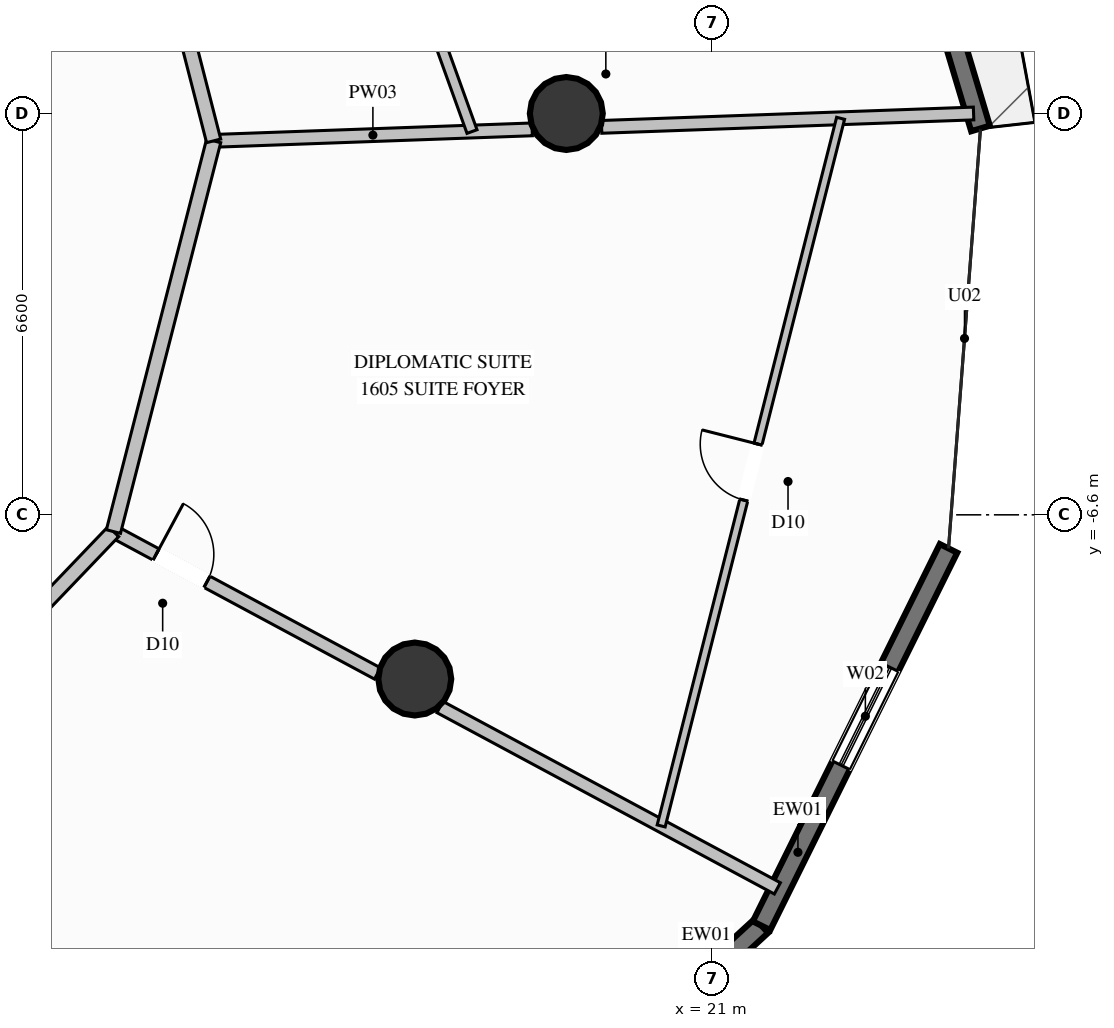
"""IFC4 building model, lengths in metres.
Left out: names, types, materials, properties, quantities, classifications, styles, units other than length and angle.
Written with IfcOpenShell. Run it as: python <this file> out.ifc"""

import sys

from ifc_helpers import new_model, si_unit, direction, frame, frame_2d, origin, origin_2d, place, context, subcontext, project, spatial, rectangle, circle, extrude, element, fill, save


model = new_model("IFC4")
c1 = context("Model", 3, precision=1e-05, world=origin(), true_north=direction((0.0, 1.0)))
c2 = subcontext(c1, "Body", "Model", "MODEL_VIEW")
j1 = project(units=[si_unit("LENGTHUNIT", "METRE"), si_unit("PLANEANGLEUNIT", "RADIAN")], contexts=[c1])
p1 = place(None, origin())
s1 = spatial("IfcSite", under=j1, at=p1, CompositionType="ELEMENT")
p2 = place(p1, origin())
s2 = spatial("IfcBuilding", under=s1, at=p2, CompositionType="ELEMENT")
p3 = place(p2, frame((0.0, 0.0, 60.8)))
s3 = spatial("IfcBuildingStorey", under=s2, at=p3, CompositionType="ELEMENT", Elevation=60.8)
for number, where, z_axis, x_axis in (
    (1, (18.6, 0.0, 0.0), (0.0, 0.0, 1.0), (1.0, 0.0, 0.0)),
    (2, (16.108, -9.3, 0.0), (0.0, 0.0, 1.0), (1.0, 0.0, 0.0)),
):
    element("IfcColumn", number, at=place(p3, frame(where, z_axis=z_axis, x_axis=x_axis)), inside=s3, PredefinedType="COLUMN", context=c2, shape_type="SweptSolid", body=[
        extrude(circle(Radius=0.6, at=origin_2d()), origin(), (0.0, 0.0, 1.0), 3.6),
    ])
p4 = place(p3, frame((23.338, 6.683, 0.0), z_axis=(0.0, 0.0, 1.0), x_axis=(0.286771852206, -0.957998906462, 0.0)))
e3 = element("IfcWall", 3, at=p4, inside=s3, PredefinedType="SOLIDWALL", context=c2, shape_type="SweptSolid", body=[
    extrude(rectangle(XDim=7.233, YDim=0.32, at=frame_2d((3.616, 0.0))), origin(), (0.0, 0.0, 1.0), 3.34),
])
p5 = place(p4, frame((2.789, 0.0, 0.35)))
e4 = element("IfcOpeningElement", 4, at=p5, cuts=e3, PredefinedType="OPENING", context=c2, shape_type="SweptSolid", body=[
    extrude(rectangle(XDim=1.8, YDim=2.6, at=frame_2d((0.9, 1.3))), frame((0.0, 0.17, 0.0), z_axis=(0.0, -1.0, 0.0), x_axis=(1.0, 0.0, 0.0)), (0.0, 0.0, 1.0), 0.34),
])
p6 = place(p3, frame((21.811, -13.357, 0.0), z_axis=(0.0, 0.0, 1.0), x_axis=(-0.735876522022, -0.677115754016, 0.0)))
e5 = element("IfcWall", 5, at=p6, inside=s3, PredefinedType="SOLIDWALL", context=c2, shape_type="SweptSolid", body=[
    extrude(rectangle(XDim=7.234, YDim=0.32, at=frame_2d((3.617, 0.0))), origin(), (0.0, 0.0, 1.0), 3.34),
])
p7 = place(p6, frame((2.717, 0.0, 0.35)))
e6 = element("IfcOpeningElement", 6, at=p7, cuts=e5, PredefinedType="OPENING", context=c2, shape_type="SweptSolid", body=[
    extrude(rectangle(XDim=1.8, YDim=2.6, at=frame_2d((0.9, 1.3))), frame((0.0, 0.17, 0.0), z_axis=(0.0, -1.0, 0.0), x_axis=(1.0, 0.0, 0.0)), (0.0, 0.0, 1.0), 0.34),
])
p8 = place(p3, frame((24.886, -7.152, 0.0), z_axis=(0.0, 0.0, 1.0), x_axis=(-0.444037823644, -0.896008041914, 0.0)))
e7 = element("IfcWall", 7, at=p8, inside=s3, PredefinedType="SOLIDWALL", context=c2, shape_type="SweptSolid", body=[
    extrude(rectangle(XDim=6.925, YDim=0.32, at=frame_2d((3.462, 0.0))), origin(), (0.0, 0.0, 1.0), 3.34),
])
p9 = place(p8, frame((2.18, 0.0, 0.35)))
e8 = element("IfcOpeningElement", 8, at=p9, cuts=e7, PredefinedType="OPENING", context=c2, shape_type="SweptSolid", body=[
    extrude(rectangle(XDim=1.8, YDim=2.6, at=frame_2d((0.9, 1.3))), frame((0.0, 0.17, 0.0), z_axis=(0.0, -1.0, 0.0), x_axis=(1.0, 0.0, 0.0)), (0.0, 0.0, 1.0), 0.34),
])
p10 = place(p3, frame((12.8, -0.45, 0.0), z_axis=(0.0, 0.0, 1.0), x_axis=(0.999349913371, 0.03605205467, 0.0)))
e9 = element("IfcWall", 9, at=p10, inside=s3, PredefinedType="PARTITIONING", context=c2, shape_type="SweptSolid", body=[
    extrude(rectangle(XDim=5.241, YDim=0.21, at=frame_2d((2.621, 0.0))), origin(), (0.0, 0.0, 1.0), 2.709),
])
p11 = place(p3, frame((19.18, -0.22, 0.0), z_axis=(0.0, 0.0, 1.0), x_axis=(0.999354291278, 0.035930495469, 0.0)))
e10 = element("IfcWall", 10, at=p11, inside=s3, PredefinedType="PARTITIONING", context=c2, shape_type="SweptSolid", body=[
    extrude(rectangle(XDim=6.122, YDim=0.21, at=frame_2d((3.061, 0.0))), origin(), (0.0, 0.0, 1.0), 3.34),
])
p12 = place(p3, frame((11.152, -6.875, 0.0), z_axis=(0.0, 0.0, 1.0), x_axis=(0.880857176103, -0.473382123984, 0.0)))
e11 = element("IfcWall", 11, at=p12, inside=s3, PredefinedType="PARTITIONING", context=c2, shape_type="SweptSolid", body=[
    extrude(rectangle(XDim=4.93, YDim=0.21, at=frame_2d((2.465, 0.0))), origin(), (0.0, 0.0, 1.0), 2.709),
])
p13 = place(p12, frame((0.796, 0.0, 0.0)))
e12 = element("IfcOpeningElement", 12, at=p13, cuts=e11, PredefinedType="OPENING", context=c2, shape_type="SweptSolid", body=[
    extrude(rectangle(XDim=0.95, YDim=2.1, at=frame_2d((0.475, 1.05))), frame((0.0, 0.115, 0.0), z_axis=(0.0, -1.0, 0.0), x_axis=(1.0, 0.0, 0.0)), (0.0, 0.0, 1.0), 0.23),
])
p14 = place(p3, frame((16.522, -9.761, 0.0), z_axis=(0.0, 0.0, 1.0), x_axis=(0.880870251888, -0.473357792097, 0.0)))
e13 = element("IfcWall", 13, at=p14, inside=s3, PredefinedType="PARTITIONING", context=c2, shape_type="SweptSolid", body=[
    extrude(rectangle(XDim=6.3, YDim=0.21, at=frame_2d((3.15, 0.0))), origin(), (0.0, 0.0, 1.0), 3.34),
])
p15 = place(p3, frame((6.65, -11.578, 0.0), z_axis=(0.0, 0.0, 1.0), x_axis=(0.691526541012, 0.72235105252, 0.0)))
e14 = element("IfcWall", 14, at=p15, inside=s3, PredefinedType="PARTITIONING", context=c2, shape_type="SweptSolid", body=[
    extrude(rectangle(XDim=6.51, YDim=0.24, at=frame_2d((3.255, 0.0))), origin(), (0.0, 0.0, 1.0), 3.34),
])
p16 = place(p3, frame((11.152, -6.875, 0.0), z_axis=(0.0, 0.0, 1.0), x_axis=(0.248446193127, 0.968645698447, 0.0)))
e15 = element("IfcWall", 15, at=p16, inside=s3, PredefinedType="PARTITIONING", context=c2, shape_type="SweptSolid", body=[
    extrude(rectangle(XDim=6.633, YDim=0.24, at=frame_2d((3.316, 0.0))), origin(), (0.0, 0.0, 1.0), 3.34),
])
p17 = place(p3, frame((20.16, -11.716, 0.0), z_axis=(0.0, 0.0, 1.0), x_axis=(0.245821486201, 0.969315117453, 0.0)))
e16 = element("IfcWall", 16, at=p17, inside=s3, PredefinedType="PARTITIONING", context=c2, shape_type="SweptSolid", body=[
    extrude(rectangle(XDim=12.005, YDim=0.135, at=frame_2d((6.003, 0.0))), origin(), (0.0, 0.0, 1.0), 3.34),
])
p18 = place(p17, frame((5.528, 0.0, 0.0)))
e17 = element("IfcOpeningElement", 17, at=p18, cuts=e16, PredefinedType="OPENING", context=c2, shape_type="SweptSolid", body=[
    extrude(rectangle(XDim=0.95, YDim=2.1, at=frame_2d((0.475, 1.05))), frame((0.0, 0.078, 0.0), z_axis=(0.0, -1.0, 0.0), x_axis=(1.0, 0.0, 0.0)), (0.0, 0.0, 1.0), 0.155),
])
p19 = place(p3, frame((12.8, -0.45, 0.0), z_axis=(0.0, 0.0, 1.0), x_axis=(-0.248491333658, 0.968634119313, 0.0)))
e18 = element("IfcWall", 18, at=p19, inside=s3, PredefinedType="PARTITIONING", context=c2, shape_type="SweptSolid", body=[
    extrude(rectangle(XDim=2.785, YDim=0.24, at=frame_2d((1.393, 0.0))), origin(), (0.0, 0.0, 1.0), 3.34),
])
p20 = place(p3, frame((17.049, -0.297, 0.0), z_axis=(0.0, 0.0, 1.0), x_axis=(-0.338731363066, 0.940883129658, 0.0)))
e19 = element("IfcWall", 19, at=p20, inside=s3, PredefinedType="PLUMBINGWALL", context=c2, shape_type="SweptSolid", body=[
    extrude(rectangle(XDim=3.634, YDim=0.175, at=frame_2d((1.817, 0.0))), origin(), (0.0, 0.0, 1.0), 3.34),
])
p21 = place(p9, origin())
e20 = element("IfcWindow", 20, at=p21, inside=s3, PartitioningType="SINGLE_PANEL", PredefinedType="WINDOW", context=c2, shape_type="SweptSolid", body=[
    extrude(rectangle(XDim=1.8, YDim=2.6, at=frame_2d((0.9, 1.3))), frame((0.0, 0.03, 0.0), z_axis=(0.0, -1.0, 0.0), x_axis=(1.0, 0.0, 0.0)), (0.0, 0.0, 1.0), 0.06),
])
fill(e8, e20)
p22 = place(p13, origin())
e21 = element("IfcDoor", 21, at=p22, inside=s3, OperationType="SINGLE_SWING_LEFT", PredefinedType="DOOR", context=c2, shape_type="SweptSolid", body=[
    extrude(rectangle(XDim=0.95, YDim=2.1, at=frame_2d((0.475, 1.05))), frame((0.0, 0.025, 0.0), z_axis=(0.0, -1.0, 0.0), x_axis=(1.0, 0.0, 0.0)), (0.0, 0.0, 1.0), 0.05),
])
fill(e12, e21)
p23 = place(p18, origin())
e22 = element("IfcDoor", 22, at=p23, inside=s3, OperationType="SINGLE_SWING_RIGHT", PredefinedType="DOOR", context=c2, shape_type="SweptSolid", body=[
    extrude(rectangle(XDim=0.95, YDim=2.1, at=frame_2d((0.475, 1.05))), frame((0.0, 0.025, 0.0), z_axis=(0.0, -1.0, 0.0), x_axis=(1.0, 0.0, 0.0)), (0.0, 0.0, 1.0), 0.05),
])
fill(e17, e22)
save(model, sys.argv[1])
